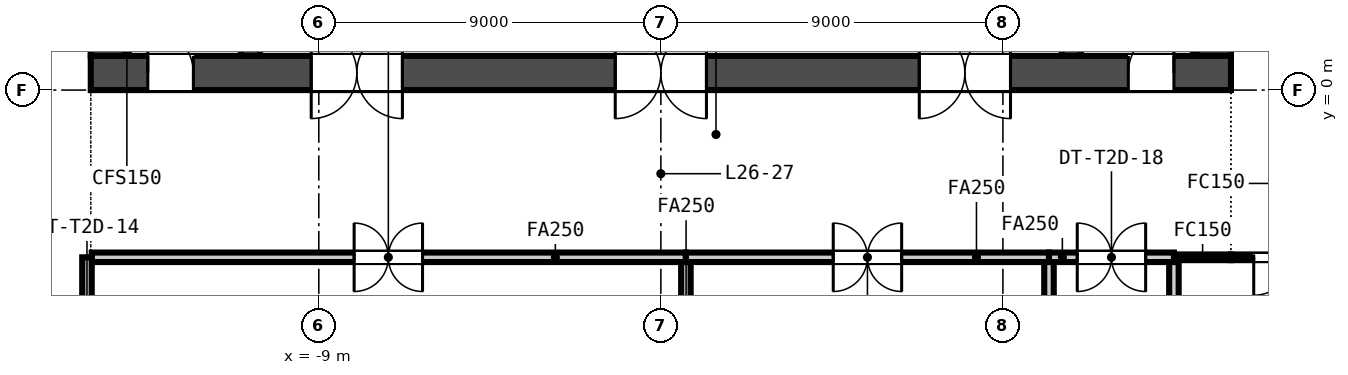
"""IFC4 building model, lengths in metres.
Left out: names, types, materials, properties, quantities, classifications, styles, units other than length and angle.
Written with IfcOpenShell. Run it as: python <this file> out.ifc"""

import sys

from ifc_helpers import new_model, si_unit, direction, frame, frame_2d, origin, place, context, subcontext, project, spatial, rectangle, extrude, element, fill, save


model = new_model("IFC4")
c1 = context("Model", 3, precision=1e-05, world=origin(), true_north=direction((0.0, 1.0)))
c2 = subcontext(c1, "Body", "Model", "MODEL_VIEW")
j1 = project(units=[si_unit("LENGTHUNIT", "METRE"), si_unit("PLANEANGLEUNIT", "RADIAN")], contexts=[c1])
p1 = place(None, origin())
s1 = spatial("IfcSite", under=j1, at=p1, CompositionType="ELEMENT")
p2 = place(p1, origin())
s2 = spatial("IfcBuilding", under=s1, at=p2, CompositionType="ELEMENT")
p3 = place(p2, frame((0.0, 0.0, 109.85)))
s3 = spatial("IfcBuildingStorey", under=s2, at=p3, CompositionType="ELEMENT", Elevation=109.85)
p4 = place(p3, frame((-15.0, 0.45, -0.15), z_axis=(0.0, 0.0, 1.0), x_axis=(1.0, 0.0, 0.0)))
e1 = element("IfcWall", 1, at=p4, inside=s3, PredefinedType="SOLIDWALL", context=c2, shape_type="SweptSolid", body=[
    extrude(rectangle(XDim=30.0, YDim=0.9, at=frame_2d((15.0, 0.0))), origin(), (0.0, 0.0, 1.0), 3.65),
])
p5 = place(p4, frame((5.8, 0.0, 0.15)))
e2 = element("IfcOpeningElement", 2, at=p5, cuts=e1, PredefinedType="OPENING", context=c2, shape_type="SweptSolid", body=[
    extrude(rectangle(XDim=2.4, YDim=2.4, at=frame_2d((1.2, 1.2))), frame((0.0, 0.46, 0.0), z_axis=(0.0, -1.0, 0.0), x_axis=(1.0, 0.0, 0.0)), (0.0, 0.0, 1.0), 0.92),
])
p6 = place(p4, frame((13.8, 0.0, 0.15)))
e3 = element("IfcOpeningElement", 3, at=p6, cuts=e1, PredefinedType="OPENING", context=c2, shape_type="SweptSolid", body=[
    extrude(rectangle(XDim=2.4, YDim=2.4, at=frame_2d((1.2, 1.2))), frame((0.0, 0.46, 0.0), z_axis=(0.0, -1.0, 0.0), x_axis=(1.0, 0.0, 0.0)), (0.0, 0.0, 1.0), 0.92),
])
p7 = place(p4, frame((21.8, 0.0, 0.15)))
e4 = element("IfcOpeningElement", 4, at=p7, cuts=e1, PredefinedType="OPENING", context=c2, shape_type="SweptSolid", body=[
    extrude(rectangle(XDim=2.4, YDim=2.4, at=frame_2d((1.2, 1.2))), frame((0.0, 0.46, 0.0), z_axis=(0.0, -1.0, 0.0), x_axis=(1.0, 0.0, 0.0)), (0.0, 0.0, 1.0), 0.92),
])
p8 = place(p4, frame((1.5, 0.0, 0.15)))
e5 = element("IfcOpeningElement", 5, at=p8, cuts=e1, PredefinedType="OPENING", context=c2, shape_type="SweptSolid", body=[
    extrude(rectangle(XDim=1.2, YDim=2.1, at=frame_2d((0.6, 1.05))), frame((0.0, 0.46, 0.0), z_axis=(0.0, -1.0, 0.0), x_axis=(1.0, 0.0, 0.0)), (0.0, 0.0, 1.0), 0.92),
])
p9 = place(p4, frame((27.3, 0.0, 0.15)))
e6 = element("IfcOpeningElement", 6, at=p9, cuts=e1, PredefinedType="OPENING", context=c2, shape_type="SweptSolid", body=[
    extrude(rectangle(XDim=1.2, YDim=2.1, at=frame_2d((0.6, 1.05))), frame((0.0, 0.46, 0.0), z_axis=(0.0, -1.0, 0.0), x_axis=(1.0, 0.0, 0.0)), (0.0, 0.0, 1.0), 0.92),
])
for number, where, z_axis, x_axis in (
    (7, (-14.55, 0.9, -0.15), (0.0, 0.0, 1.0), (0.0, 1.0, 0.0)),
    (8, (14.55, 0.9, -0.15), (0.0, 0.0, 1.0), (0.0, 1.0, 0.0)),
):
    element("IfcWall", number, at=place(p3, frame(where, z_axis=z_axis, x_axis=x_axis)), inside=s3, PredefinedType="SOLIDWALL", context=c2, shape_type="SweptSolid", body=[
        extrude(rectangle(XDim=13.2, YDim=0.9, at=frame_2d((6.6, 0.0))), origin(), (0.0, 0.0, 1.0), 3.65),
    ])
for number, where, z_axis, x_axis in (
    (9, (-10.8, 0.9, -0.15), (0.0, 0.0, 1.0), (0.0, 1.0, 0.0)),
    (10, (10.8, 0.9, -0.15), (0.0, 0.0, 1.0), (0.0, 1.0, 0.0)),
):
    element("IfcWall", number, at=place(p3, frame(where, z_axis=z_axis, x_axis=x_axis)), inside=s3, PredefinedType="SOLIDWALL", context=c2, shape_type="SweptSolid", body=[
        extrude(rectangle(XDim=13.2, YDim=0.5, at=frame_2d((6.6, 0.0))), origin(), (0.0, 0.0, 1.0), 3.65),
    ])
for number, where, z_axis, x_axis in (
    (11, (-14.05, 0.9, 0.0), (0.0, 0.0, 1.0), (0.0, 1.0, 0.0)),
    (12, (14.05, 0.9, 0.0), (0.0, 0.0, 1.0), (0.0, 1.0, 0.0)),
):
    element("IfcWall", number, at=place(p3, frame(where, z_axis=z_axis, x_axis=x_axis)), inside=s3, PredefinedType="SOLIDWALL", context=c2, shape_type="SweptSolid", body=[
        extrude(rectangle(XDim=13.2, YDim=0.1, at=frame_2d((6.6, 0.0))), origin(), (0.0, 0.0, 1.0), 3.5),
    ])
p10 = place(p3, frame((15.0, -4.4, 0.0), z_axis=(0.0, 0.0, 1.0), x_axis=(-1.0, 0.0, 0.0)))
e13 = element("IfcWall", 13, at=p10, inside=s3, PredefinedType="PARTITIONING", context=c2, shape_type="SweptSolid", body=[
    extrude(rectangle(XDim=1.5, YDim=0.15, at=frame_2d((0.75, 0.0))), origin(), (0.0, 0.0, 1.0), 2.741),
])
p11 = place(p3, frame((0.659, -4.4, 0.0), z_axis=(0.0, 0.0, 1.0), x_axis=(-1.0, 0.0, 0.0)))
e14 = element("IfcWall", 14, at=p11, inside=s3, PredefinedType="PARTITIONING", context=c2, shape_type="SweptSolid", body=[
    extrude(rectangle(XDim=15.634, YDim=0.25, at=frame_2d((7.817, 0.0))), origin(), (0.0, 0.0, 1.0), 2.741),
])
p12 = place(p11, frame((6.929, 0.0, 0.0)))
e15 = element("IfcOpeningElement", 15, at=p12, cuts=e14, PredefinedType="OPENING", context=c2, shape_type="SweptSolid", body=[
    extrude(rectangle(XDim=1.8, YDim=2.1, at=frame_2d((0.9, 1.05))), frame((0.0, 0.135, 0.0), z_axis=(0.0, -1.0, 0.0), x_axis=(1.0, 0.0, 0.0)), (0.0, 0.0, 1.0), 0.27),
])
p13 = place(p3, frame((10.213, -4.4, 0.0), z_axis=(0.0, 0.0, 1.0), x_axis=(-1.0, 0.0, 0.0)))
e16 = element("IfcWall", 16, at=p13, inside=s3, PredefinedType="PARTITIONING", context=c2, shape_type="SweptSolid", body=[
    extrude(rectangle(XDim=9.554, YDim=0.25, at=frame_2d((4.777, 0.0))), origin(), (0.0, 0.0, 1.0), 2.741),
])
p14 = place(p13, frame((3.877, 0.0, 0.0)))
e17 = element("IfcOpeningElement", 17, at=p14, cuts=e16, PredefinedType="OPENING", context=c2, shape_type="SweptSolid", body=[
    extrude(rectangle(XDim=1.8, YDim=2.1, at=frame_2d((0.9, 1.05))), frame((0.0, 0.135, 0.0), z_axis=(0.0, -1.0, 0.0), x_axis=(1.0, 0.0, 0.0)), (0.0, 0.0, 1.0), 0.27),
])
p15 = place(p3, frame((13.5, -4.4, 0.0), z_axis=(0.0, 0.0, 1.0), x_axis=(-1.0, 0.0, 0.0)))
e18 = element("IfcWall", 18, at=p15, inside=s3, PredefinedType="PARTITIONING", context=c2, shape_type="SweptSolid", body=[
    extrude(rectangle(XDim=3.287, YDim=0.25, at=frame_2d((1.644, 0.0))), origin(), (0.0, 0.0, 1.0), 2.741),
])
p16 = place(p15, frame((0.743, 0.0, 0.0)))
e19 = element("IfcOpeningElement", 19, at=p16, cuts=e18, PredefinedType="OPENING", context=c2, shape_type="SweptSolid", body=[
    extrude(rectangle(XDim=1.8, YDim=2.1, at=frame_2d((0.9, 1.05))), frame((0.0, 0.135, 0.0), z_axis=(0.0, -1.0, 0.0), x_axis=(1.0, 0.0, 0.0)), (0.0, 0.0, 1.0), 0.27),
])
p17 = place(p3, frame((17.2, -4.4, 0.0), z_axis=(0.0, 0.0, 1.0), x_axis=(-1.0, 0.0, 0.0)))
e20 = element("IfcWall", 20, at=p17, inside=s3, PredefinedType="PARTITIONING", context=c2, shape_type="SweptSolid", body=[
    extrude(rectangle(XDim=2.2, YDim=0.15, at=frame_2d((1.1, 0.0))), origin(), (0.0, 0.0, 1.0), 2.741),
])
p18 = place(p17, frame((0.6, 0.0, 0.0)))
e21 = element("IfcOpeningElement", 21, at=p18, cuts=e20, PredefinedType="OPENING", context=c2, shape_type="SweptSolid", body=[
    extrude(rectangle(XDim=1.0, YDim=2.1, at=frame_2d((0.5, 1.05))), frame((0.0, 0.085, 0.0), z_axis=(0.0, -1.0, 0.0), x_axis=(1.0, 0.0, 0.0)), (0.0, 0.0, 1.0), 0.17),
])
p19 = place(p3, frame((-15.1, -4.4, 0.0), z_axis=(0.0, 0.0, 1.0), x_axis=(0.0, -1.0, 0.0)))
e22 = element("IfcWall", 22, at=p19, inside=s3, PredefinedType="PARTITIONING", context=c2, shape_type="SweptSolid", body=[
    extrude(rectangle(XDim=15.875, YDim=0.25, at=frame_2d((7.938, 0.0))), origin(), (0.0, 0.0, 1.0), 2.741),
])
p20 = place(p19, frame((5.133, 0.0, 0.0)))
e23 = element("IfcOpeningElement", 23, at=p20, cuts=e22, PredefinedType="OPENING", context=c2, shape_type="SweptSolid", body=[
    extrude(rectangle(XDim=1.8, YDim=2.1, at=frame_2d((0.9, 1.05))), frame((0.0, 0.135, 0.0), z_axis=(0.0, -1.0, 0.0), x_axis=(1.0, 0.0, 0.0)), (0.0, 0.0, 1.0), 0.27),
])
p21 = place(p3, frame((0.659, -8.85, 0.0), z_axis=(0.0, 0.0, 1.0), x_axis=(0.0, 1.0, 0.0)))
e24 = element("IfcWall", 24, at=p21, inside=s3, PredefinedType="PARTITIONING", context=c2, shape_type="SweptSolid", body=[
    extrude(rectangle(XDim=4.325, YDim=0.25, at=frame_2d((2.163, 0.0))), origin(), (0.0, 0.0, 1.0), 2.741),
])
p22 = place(p3, frame((10.213, -29.216, 0.0), z_axis=(0.0, 0.0, 1.0), x_axis=(0.0, 1.0, 0.0)))
e25 = element("IfcWall", 25, at=p22, inside=s3, PredefinedType="PARTITIONING", context=c2, shape_type="SweptSolid", body=[
    extrude(rectangle(XDim=24.691, YDim=0.25, at=frame_2d((12.346, 0.0))), origin(), (0.0, 0.0, 1.0), 2.741),
])
p23 = place(p3, frame((13.5, -28.217, 0.0), z_axis=(0.0, 0.0, 1.0), x_axis=(0.0, 1.0, 0.0)))
e26 = element("IfcWall", 26, at=p23, inside=s3, PredefinedType="PARTITIONING", context=c2, shape_type="SweptSolid", body=[
    extrude(rectangle(XDim=23.692, YDim=0.25, at=frame_2d((11.846, 0.0))), origin(), (0.0, 0.0, 1.0), 2.741),
])
p24 = place(p5, origin())
e27 = element("IfcDoor", 27, at=p24, inside=s3, OperationType="DOUBLE_DOOR_DOUBLE_SWING", PredefinedType="DOOR", context=c2, shape_type="SweptSolid", body=[
    extrude(rectangle(XDim=2.4, YDim=2.4, at=frame_2d((1.2, 1.2))), frame((0.0, 0.025, 0.0), z_axis=(0.0, -1.0, 0.0), x_axis=(1.0, 0.0, 0.0)), (0.0, 0.0, 1.0), 0.05),
])
fill(e2, e27)
p25 = place(p6, origin())
e28 = element("IfcDoor", 28, at=p25, inside=s3, OperationType="DOUBLE_DOOR_DOUBLE_SWING", PredefinedType="DOOR", context=c2, shape_type="SweptSolid", body=[
    extrude(rectangle(XDim=2.4, YDim=2.4, at=frame_2d((1.2, 1.2))), frame((0.0, 0.025, 0.0), z_axis=(0.0, -1.0, 0.0), x_axis=(1.0, 0.0, 0.0)), (0.0, 0.0, 1.0), 0.05),
])
fill(e3, e28)
p26 = place(p7, origin())
e29 = element("IfcDoor", 29, at=p26, inside=s3, OperationType="DOUBLE_DOOR_DOUBLE_SWING", PredefinedType="DOOR", context=c2, shape_type="SweptSolid", body=[
    extrude(rectangle(XDim=2.4, YDim=2.4, at=frame_2d((1.2, 1.2))), frame((0.0, 0.025, 0.0), z_axis=(0.0, -1.0, 0.0), x_axis=(1.0, 0.0, 0.0)), (0.0, 0.0, 1.0), 0.05),
])
fill(e4, e29)
p27 = place(p8, origin())
e30 = element("IfcDoor", 30, at=p27, inside=s3, OperationType="SINGLE_SWING_LEFT", PredefinedType="DOOR", context=c2, shape_type="SweptSolid", body=[
    extrude(rectangle(XDim=1.2, YDim=2.1, at=frame_2d((0.6, 1.05))), frame((0.0, 0.025, 0.0), z_axis=(0.0, -1.0, 0.0), x_axis=(1.0, 0.0, 0.0)), (0.0, 0.0, 1.0), 0.05),
])
fill(e5, e30)
p28 = place(p9, origin())
e31 = element("IfcDoor", 31, at=p28, inside=s3, OperationType="SINGLE_SWING_RIGHT", PredefinedType="DOOR", context=c2, shape_type="SweptSolid", body=[
    extrude(rectangle(XDim=1.2, YDim=2.1, at=frame_2d((0.6, 1.05))), frame((0.0, 0.025, 0.0), z_axis=(0.0, -1.0, 0.0), x_axis=(1.0, 0.0, 0.0)), (0.0, 0.0, 1.0), 0.05),
])
fill(e6, e31)
p29 = place(p18, origin())
e32 = element("IfcDoor", 32, at=p29, inside=s3, OperationType="SINGLE_SWING_RIGHT", PredefinedType="DOOR", context=c2, shape_type="SweptSolid", body=[
    extrude(rectangle(XDim=1.0, YDim=2.1, at=frame_2d((0.5, 1.05))), frame((0.0, 0.025, 0.0), z_axis=(0.0, -1.0, 0.0), x_axis=(1.0, 0.0, 0.0)), (0.0, 0.0, 1.0), 0.05),
])
fill(e21, e32)
p30 = place(p12, origin())
e33 = element("IfcDoor", 33, at=p30, inside=s3, OperationType="DOUBLE_DOOR_DOUBLE_SWING", PredefinedType="DOOR", context=c2, shape_type="SweptSolid", body=[
    extrude(rectangle(XDim=1.8, YDim=2.1, at=frame_2d((0.9, 1.05))), frame((0.0, 0.025, 0.0), z_axis=(0.0, -1.0, 0.0), x_axis=(1.0, 0.0, 0.0)), (0.0, 0.0, 1.0), 0.05),
])
fill(e15, e33)
p31 = place(p14, origin())
e34 = element("IfcDoor", 34, at=p31, inside=s3, OperationType="DOUBLE_DOOR_DOUBLE_SWING", PredefinedType="DOOR", context=c2, shape_type="SweptSolid", body=[
    extrude(rectangle(XDim=1.8, YDim=2.1, at=frame_2d((0.9, 1.05))), frame((0.0, 0.025, 0.0), z_axis=(0.0, -1.0, 0.0), x_axis=(1.0, 0.0, 0.0)), (0.0, 0.0, 1.0), 0.05),
])
fill(e17, e34)
p32 = place(p16, origin())
e35 = element("IfcDoor", 35, at=p32, inside=s3, OperationType="DOUBLE_DOOR_DOUBLE_SWING", PredefinedType="DOOR", context=c2, shape_type="SweptSolid", body=[
    extrude(rectangle(XDim=1.8, YDim=2.1, at=frame_2d((0.9, 1.05))), frame((0.0, 0.025, 0.0), z_axis=(0.0, -1.0, 0.0), x_axis=(1.0, 0.0, 0.0)), (0.0, 0.0, 1.0), 0.05),
])
fill(e19, e35)
save(model, sys.argv[1])
